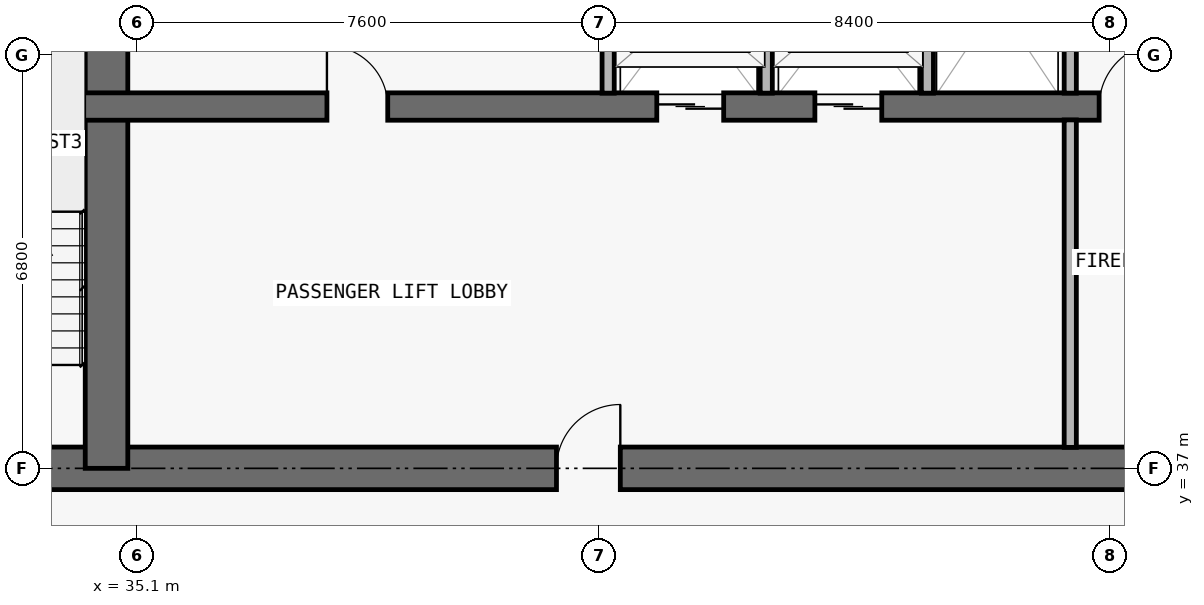
"""IFC4 building model, lengths in metres.
Left out: names, types, materials, properties, quantities, classifications, styles, units other than length and angle.
Written with IfcOpenShell. Run it as: python <this file> out.ifc"""

import sys

from ifc_helpers import new_model, si_unit, direction, frame, frame_2d, origin, place, context, subcontext, project, spatial, rectangle, extrude, element, fill, save


model = new_model("IFC4")
c1 = context("Model", 3, precision=1e-05, world=origin(), true_north=direction((0.0, 1.0)))
c2 = subcontext(c1, "Body", "Model", "MODEL_VIEW")
j1 = project(units=[si_unit("LENGTHUNIT", "METRE"), si_unit("PLANEANGLEUNIT", "RADIAN")], contexts=[c1])
p1 = place(None, origin())
s1 = spatial("IfcSite", under=j1, at=p1, CompositionType="ELEMENT")
p2 = place(p1, origin())
s2 = spatial("IfcBuilding", under=s1, at=p2, CompositionType="ELEMENT")
p3 = place(p2, frame((0.0, 0.0, 167.1)))
s3 = spatial("IfcBuildingStorey", under=s2, at=p3, CompositionType="ELEMENT", Elevation=167.1)
p4 = place(p3, frame((17.95, 37.0, 0.0), z_axis=(0.0, 0.0, 1.0), x_axis=(1.0, 0.0, 0.0)))
e1 = element("IfcWall", 1, at=p4, inside=s3, PredefinedType="SHEAR", context=c2, shape_type="SweptSolid", body=[
    extrude(rectangle(XDim=41.9, YDim=0.7, at=frame_2d((20.95, 0.0))), origin(), (0.0, 0.0, 1.0), 3.05),
])
p5 = place(p4, frame((14.35, 0.0, 0.0)))
e2 = element("IfcOpeningElement", 2, at=p5, cuts=e1, PredefinedType="OPENING", context=c2, shape_type="SweptSolid", body=[
    extrude(rectangle(XDim=1.1, YDim=2.15, at=frame_2d((0.55, 1.075))), frame((0.0, 0.36, 0.0), z_axis=(0.0, -1.0, 0.0), x_axis=(1.0, 0.0, 0.0)), (0.0, 0.0, 1.0), 0.72),
])
p6 = place(p4, frame((6.2, 0.0, 0.0)))
e3 = element("IfcOpeningElement", 3, at=p6, cuts=e1, PredefinedType="OPENING", context=c2, shape_type="SweptSolid", body=[
    extrude(rectangle(XDim=1.05, YDim=2.15, at=frame_2d((0.525, 1.075))), frame((0.0, 0.36, 0.0), z_axis=(0.0, -1.0, 0.0), x_axis=(1.0, 0.0, 0.0)), (0.0, 0.0, 1.0), 0.72),
])
p7 = place(p4, frame((34.7, 0.0, 0.0)))
e4 = element("IfcOpeningElement", 4, at=p7, cuts=e1, PredefinedType="OPENING", context=c2, shape_type="SweptSolid", body=[
    extrude(rectangle(XDim=1.05, YDim=2.15, at=frame_2d((0.525, 1.075))), frame((0.0, 0.36, 0.0), z_axis=(0.0, -1.0, 0.0), x_axis=(1.0, 0.0, 0.0)), (0.0, 0.0, 1.0), 0.72),
])
p8 = place(p4, frame((10.812, 0.0, 0.0)))
e5 = element("IfcOpeningElement", 5, at=p8, cuts=e1, PredefinedType="OPENING", context=c2, shape_type="SweptSolid", body=[
    extrude(rectangle(XDim=1.05, YDim=2.15, at=frame_2d((0.525, 1.075))), frame((0.0, 0.36, 0.0), z_axis=(0.0, -1.0, 0.0), x_axis=(1.0, 0.0, 0.0)), (0.0, 0.0, 1.0), 0.72),
])
p9 = place(p4, frame((24.05, 0.0, 0.0)))
e6 = element("IfcOpeningElement", 6, at=p9, cuts=e1, PredefinedType="OPENING", context=c2, shape_type="SweptSolid", body=[
    extrude(rectangle(XDim=1.05, YDim=2.15, at=frame_2d((0.525, 1.075))), frame((0.0, 0.36, 0.0), z_axis=(0.0, -1.0, 0.0), x_axis=(1.0, 0.0, 0.0)), (0.0, 0.0, 1.0), 0.72),
])
p10 = place(p3, frame((34.6, 37.0, 0.0), z_axis=(0.0, 0.0, 1.0), x_axis=(0.0, 1.0, 0.0)))
e7 = element("IfcWall", 7, at=p10, inside=s3, PredefinedType="SHEAR", context=c2, shape_type="SweptSolid", body=[
    extrude(rectangle(XDim=9.575, YDim=0.7, at=frame_2d((4.788, 0.0))), origin(), (0.0, 0.0, 1.0), 3.05),
])
p11 = place(p3, frame((22.25, 42.95, 0.0), z_axis=(0.0, 0.0, 1.0), x_axis=(1.0, 0.0, 0.0)))
e8 = element("IfcWall", 8, at=p11, inside=s3, PredefinedType="SHEAR", context=c2, shape_type="SweptSolid", body=[
    extrude(rectangle(XDim=33.3, YDim=0.45, at=frame_2d((16.65, 0.0))), origin(), (0.0, 0.0, 1.0), 3.05),
])
p12 = place(p11, frame((1.05, 0.0, 0.0)))
e9 = element("IfcOpeningElement", 9, at=p12, cuts=e8, PredefinedType="OPENING", context=c2, shape_type="SweptSolid", body=[
    extrude(rectangle(XDim=1.2, YDim=2.2, at=frame_2d((0.6, 1.1))), frame((0.0, 0.235, 0.0), z_axis=(0.0, -1.0, 0.0), x_axis=(1.0, 0.0, 0.0)), (0.0, 0.0, 1.0), 0.47),
])
p13 = place(p11, frame((31.05, 0.0, 0.0)))
e10 = element("IfcOpeningElement", 10, at=p13, cuts=e8, PredefinedType="OPENING", context=c2, shape_type="SweptSolid", body=[
    extrude(rectangle(XDim=1.2, YDim=2.2, at=frame_2d((0.6, 1.1))), frame((0.0, 0.235, 0.0), z_axis=(0.0, -1.0, 0.0), x_axis=(1.0, 0.0, 0.0)), (0.0, 0.0, 1.0), 0.47),
])
p14 = place(p11, frame((21.4, 0.0, 0.0)))
e11 = element("IfcOpeningElement", 11, at=p14, cuts=e8, PredefinedType="OPENING", context=c2, shape_type="SweptSolid", body=[
    extrude(rectangle(XDim=1.1, YDim=2.2, at=frame_2d((0.55, 1.1))), frame((0.0, 0.235, 0.0), z_axis=(0.0, -1.0, 0.0), x_axis=(1.0, 0.0, 0.0)), (0.0, 0.0, 1.0), 0.47),
])
p15 = place(p11, frame((24.0, 0.0, 0.0)))
e12 = element("IfcOpeningElement", 12, at=p15, cuts=e8, PredefinedType="OPENING", context=c2, shape_type="SweptSolid", body=[
    extrude(rectangle(XDim=1.1, YDim=2.2, at=frame_2d((0.55, 1.1))), frame((0.0, 0.235, 0.0), z_axis=(0.0, -1.0, 0.0), x_axis=(1.0, 0.0, 0.0)), (0.0, 0.0, 1.0), 0.47),
])
p16 = place(p11, frame((3.625, 0.0, 0.0)))
e13 = element("IfcOpeningElement", 13, at=p16, cuts=e8, PredefinedType="OPENING", context=c2, shape_type="SweptSolid", body=[
    extrude(rectangle(XDim=1.05, YDim=2.15, at=frame_2d((0.525, 1.075))), frame((0.0, 0.235, 0.0), z_axis=(0.0, -1.0, 0.0), x_axis=(1.0, 0.0, 0.0)), (0.0, 0.0, 1.0), 0.47),
])
p17 = place(p11, frame((28.675, 0.0, 0.0)))
e14 = element("IfcOpeningElement", 14, at=p17, cuts=e8, PredefinedType="OPENING", context=c2, shape_type="SweptSolid", body=[
    extrude(rectangle(XDim=1.05, YDim=2.15, at=frame_2d((0.525, 1.075))), frame((0.0, 0.235, 0.0), z_axis=(0.0, -1.0, 0.0), x_axis=(1.0, 0.0, 0.0)), (0.0, 0.0, 1.0), 0.47),
])
p18 = place(p11, frame((15.975, 0.0, 0.0)))
e15 = element("IfcOpeningElement", 15, at=p18, cuts=e8, PredefinedType="OPENING", context=c2, shape_type="SweptSolid", body=[
    extrude(rectangle(XDim=1.0, YDim=2.2, at=frame_2d((0.5, 1.1))), frame((0.0, 0.235, 0.0), z_axis=(0.0, -1.0, 0.0), x_axis=(1.0, 0.0, 0.0)), (0.0, 0.0, 1.0), 0.47),
])
for number, where, z_axis, x_axis in (
    (16, (42.85, 43.17, 0.0), (0.0, 0.0, 1.0), (0.0, 1.0, 0.0)),
    (17, (45.45, 43.17, 0.0), (0.0, 0.0, 1.0), (0.0, 1.0, 0.0)),
    (18, (48.1, 43.17, 0.0), (0.0, 0.0, 1.0), (0.0, 1.0, 0.0)),
):
    element("IfcWall", number, at=place(p3, frame(where, z_axis=z_axis, x_axis=x_axis)), inside=s3, PredefinedType="PARTITIONING", context=c2, shape_type="SweptSolid", body=[
        extrude(rectangle(XDim=3.185, YDim=0.2, at=frame_2d((1.593, 0.0))), origin(), (0.0, 0.0, 1.0), 3.05),
    ])
p19 = place(p3, frame((50.45, 37.345, 0.0), z_axis=(0.0, 0.0, 1.0), x_axis=(0.0, 1.0, 0.0)))
e19 = element("IfcWall", 19, at=p19, inside=s3, PredefinedType="PARTITIONING", context=c2, shape_type="SweptSolid", body=[
    extrude(rectangle(XDim=5.385, YDim=0.2, at=frame_2d((2.692, 0.0))), origin(), (0.0, 0.0, 1.0), 3.05),
])
p20 = place(p3, frame((50.45, 43.17, 0.0), z_axis=(0.0, 0.0, 1.0), x_axis=(0.0, 1.0, 0.0)))
e20 = element("IfcWall", 20, at=p20, inside=s3, PredefinedType="PARTITIONING", context=c2, shape_type="SweptSolid", body=[
    extrude(rectangle(XDim=3.185, YDim=0.2, at=frame_2d((1.593, 0.0))), origin(), (0.0, 0.0, 1.0), 3.05),
])
p21 = place(p14, origin())
e21 = element("IfcDoor", 21, at=p21, inside=s3, OperationType="DOUBLE_DOOR_SLIDING", PredefinedType="DOOR", context=c2, shape_type="SweptSolid", body=[
    extrude(rectangle(XDim=1.1, YDim=2.2, at=frame_2d((0.55, 1.1))), frame((0.0, 0.025, 0.0), z_axis=(0.0, -1.0, 0.0), x_axis=(1.0, 0.0, 0.0)), (0.0, 0.0, 1.0), 0.05),
])
fill(e11, e21)
p22 = place(p15, origin())
e22 = element("IfcDoor", 22, at=p22, inside=s3, OperationType="DOUBLE_DOOR_SLIDING", PredefinedType="DOOR", context=c2, shape_type="SweptSolid", body=[
    extrude(rectangle(XDim=1.1, YDim=2.2, at=frame_2d((0.55, 1.1))), frame((0.0, 0.025, 0.0), z_axis=(0.0, -1.0, 0.0), x_axis=(1.0, 0.0, 0.0)), (0.0, 0.0, 1.0), 0.05),
])
fill(e12, e22)
p23 = place(p17, origin())
e23 = element("IfcDoor", 23, at=p23, inside=s3, OperationType="SINGLE_SWING_RIGHT", PredefinedType="DOOR", context=c2, shape_type="SweptSolid", body=[
    extrude(rectangle(XDim=1.05, YDim=2.15, at=frame_2d((0.525, 1.075))), frame((0.0, 0.025, 0.0), z_axis=(0.0, -1.0, 0.0), x_axis=(1.0, 0.0, 0.0)), (0.0, 0.0, 1.0), 0.05),
])
fill(e14, e23)
p24 = place(p9, origin())
e24 = element("IfcDoor", 24, at=p24, inside=s3, OperationType="SINGLE_SWING_RIGHT", PredefinedType="DOOR", context=c2, shape_type="SweptSolid", body=[
    extrude(rectangle(XDim=1.05, YDim=2.15, at=frame_2d((0.525, 1.075))), frame((0.0, 0.025, 0.0), z_axis=(0.0, -1.0, 0.0), x_axis=(1.0, 0.0, 0.0)), (0.0, 0.0, 1.0), 0.05),
])
fill(e6, e24)
p25 = place(p18, origin())
e25 = element("IfcDoor", 25, at=p25, inside=s3, OperationType="SINGLE_SWING_LEFT", PredefinedType="DOOR", context=c2, shape_type="SweptSolid", body=[
    extrude(rectangle(XDim=1.0, YDim=2.2, at=frame_2d((0.5, 1.1))), frame((0.0, 0.025, 0.0), z_axis=(0.0, -1.0, 0.0), x_axis=(1.0, 0.0, 0.0)), (0.0, 0.0, 1.0), 0.05),
])
fill(e15, e25)
save(model, sys.argv[1])
